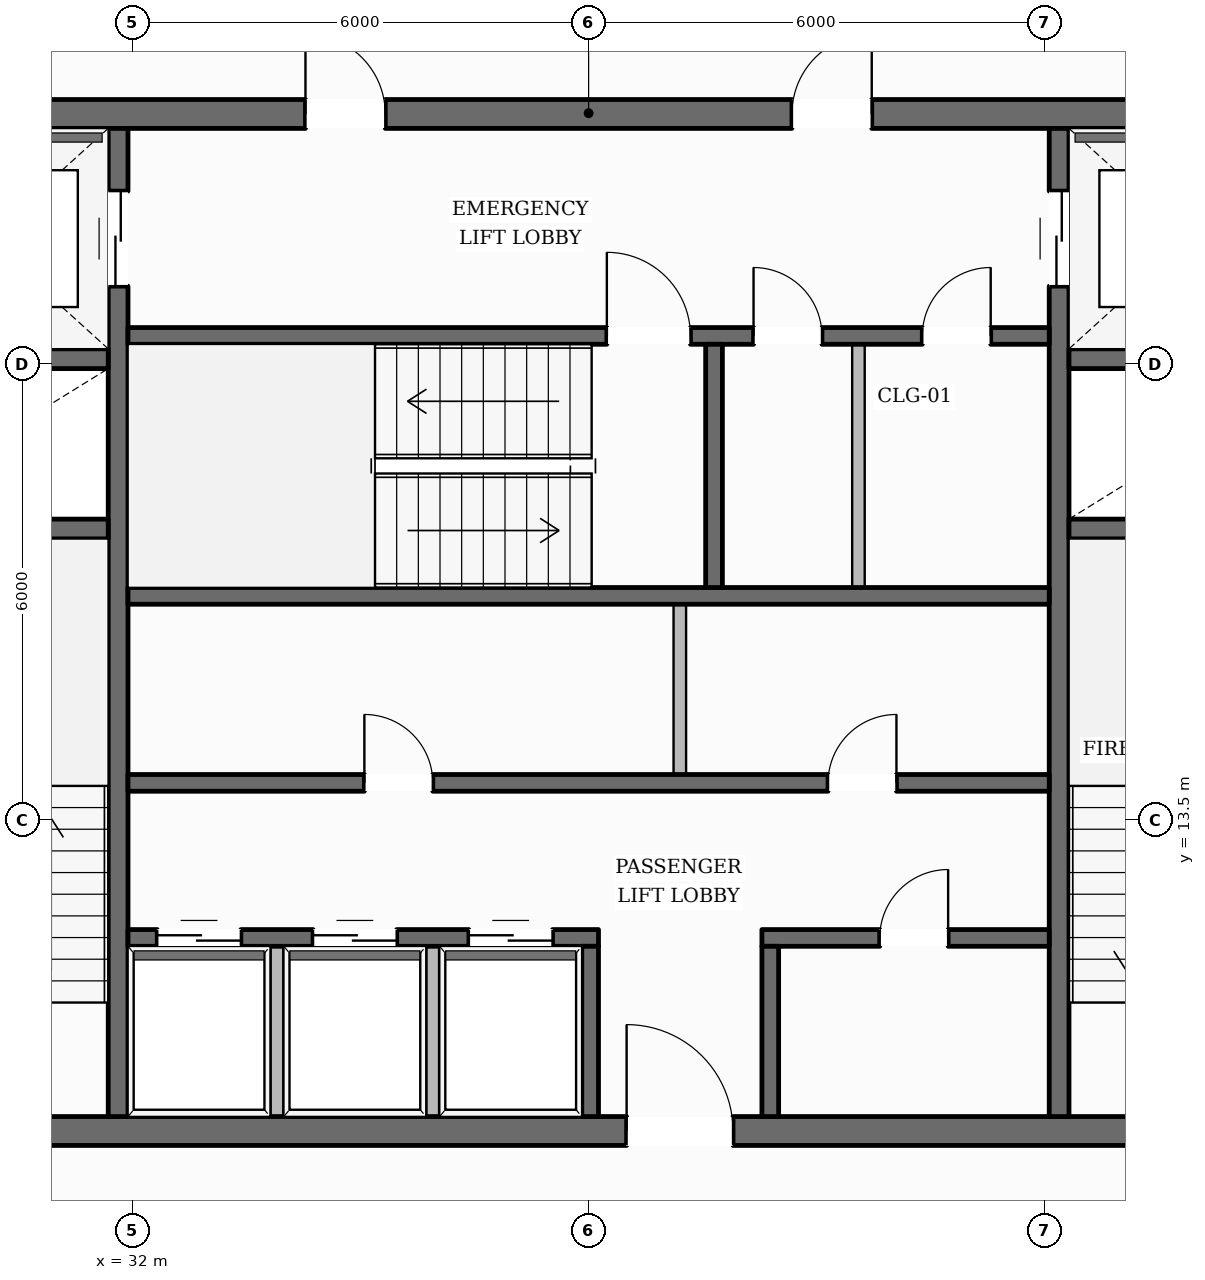
"""IFC4 building model, lengths in metres.
Left out: names, types, materials, properties, quantities, classifications, styles, units other than length and angle.
Written with IfcOpenShell. Run it as: python <this file> out.ifc"""

import sys

from ifc_helpers import new_model, si_unit, direction, frame, frame_2d, origin, place, context, subcontext, project, spatial, rectangle, extrude, element, fill, save


model = new_model("IFC4")
c1 = context("Model", 3, precision=1e-05, world=origin(), true_north=direction((0.0, 1.0)))
c2 = subcontext(c1, "Body", "Model", "MODEL_VIEW")
j1 = project(units=[si_unit("LENGTHUNIT", "METRE"), si_unit("PLANEANGLEUNIT", "RADIAN")], contexts=[c1])
p1 = place(None, origin())
s1 = spatial("IfcSite", under=j1, at=p1, CompositionType="ELEMENT")
p2 = place(p1, origin())
s2 = spatial("IfcBuilding", under=s1, at=p2, CompositionType="ELEMENT")
p3 = place(p2, frame((0.0, 0.0, 270.3)))
s3 = spatial("IfcBuildingStorey", under=s2, at=p3, CompositionType="ELEMENT", Elevation=270.3)
p4 = place(p3, frame((28.1, 9.41, 0.0), z_axis=(0.0, 0.0, 1.0), x_axis=(1.0, 0.0, 0.0)))
e1 = element("IfcWall", 1, at=p4, inside=s3, PredefinedType="SOLIDWALL", context=c2, shape_type="SweptSolid", body=[
    extrude(rectangle(XDim=19.8, YDim=0.38, at=frame_2d((9.9, 0.0))), origin(), (0.0, 0.0, 1.0), 3.61),
])
p5 = place(p4, frame((10.4, 0.0, 0.0)))
e2 = element("IfcOpeningElement", 2, at=p5, cuts=e1, PredefinedType="OPENING", context=c2, shape_type="SweptSolid", body=[
    extrude(rectangle(XDim=1.4, YDim=2.2, at=frame_2d((0.7, 1.1))), frame((0.0, 0.2, 0.0), z_axis=(0.0, -1.0, 0.0), x_axis=(1.0, 0.0, 0.0)), (0.0, 0.0, 1.0), 0.4),
])
p6 = place(p3, frame((28.1, 22.79, 0.0), z_axis=(0.0, 0.0, 1.0), x_axis=(1.0, 0.0, 0.0)))
e3 = element("IfcWall", 3, at=p6, inside=s3, PredefinedType="SOLIDWALL", context=c2, shape_type="SweptSolid", body=[
    extrude(rectangle(XDim=19.8, YDim=0.38, at=frame_2d((9.9, 0.0))), origin(), (0.0, 0.0, 1.0), 3.61),
])
p7 = place(p6, frame((6.175, 0.0, 0.0)))
e4 = element("IfcOpeningElement", 4, at=p7, cuts=e3, PredefinedType="OPENING", context=c2, shape_type="SweptSolid", body=[
    extrude(rectangle(XDim=1.05, YDim=2.15, at=frame_2d((0.525, 1.075))), frame((0.0, 0.2, 0.0), z_axis=(0.0, -1.0, 0.0), x_axis=(1.0, 0.0, 0.0)), (0.0, 0.0, 1.0), 0.4),
])
p8 = place(p6, frame((12.575, 0.0, 0.0)))
e5 = element("IfcOpeningElement", 5, at=p8, cuts=e3, PredefinedType="OPENING", context=c2, shape_type="SweptSolid", body=[
    extrude(rectangle(XDim=1.05, YDim=2.15, at=frame_2d((0.525, 1.075))), frame((0.0, 0.2, 0.0), z_axis=(0.0, -1.0, 0.0), x_axis=(1.0, 0.0, 0.0)), (0.0, 0.0, 1.0), 0.4),
])
p9 = place(p3, frame((31.81, 9.6, 0.0), z_axis=(0.0, 0.0, 1.0), x_axis=(0.0, 1.0, 0.0)))
e6 = element("IfcWall", 6, at=p9, inside=s3, PredefinedType="SHEAR", context=c2, shape_type="SweptSolid", body=[
    extrude(rectangle(XDim=13.0, YDim=0.26, at=frame_2d((6.5, 0.0))), origin(), (0.0, 0.0, 1.0), 3.61),
])
p10 = place(p9, frame((10.925, 0.0, 0.0)))
e7 = element("IfcOpeningElement", 7, at=p10, cuts=e6, PredefinedType="OPENING", context=c2, shape_type="SweptSolid", body=[
    extrude(rectangle(XDim=1.25, YDim=2.25, at=frame_2d((0.625, 1.125))), frame((0.0, 0.14, 0.0), z_axis=(0.0, -1.0, 0.0), x_axis=(1.0, 0.0, 0.0)), (0.0, 0.0, 1.0), 0.28),
])
p11 = place(p3, frame((44.19, 9.6, 0.0), z_axis=(0.0, 0.0, 1.0), x_axis=(0.0, 1.0, 0.0)))
e8 = element("IfcWall", 8, at=p11, inside=s3, PredefinedType="SHEAR", context=c2, shape_type="SweptSolid", body=[
    extrude(rectangle(XDim=13.0, YDim=0.26, at=frame_2d((6.5, 0.0))), origin(), (0.0, 0.0, 1.0), 3.61),
])
p12 = place(p11, frame((10.925, 0.0, 0.0)))
e9 = element("IfcOpeningElement", 9, at=p12, cuts=e8, PredefinedType="OPENING", context=c2, shape_type="SweptSolid", body=[
    extrude(rectangle(XDim=1.25, YDim=2.25, at=frame_2d((0.625, 1.125))), frame((0.0, 0.14, 0.0), z_axis=(0.0, -1.0, 0.0), x_axis=(1.0, 0.0, 0.0)), (0.0, 0.0, 1.0), 0.28),
])
for number, where, z_axis, x_axis in (
    (10, (28.48, 17.33, 0.0), (0.0, 0.0, 1.0), (1.0, 0.0, 0.0)),
    (11, (28.48, 19.57, 0.0), (0.0, 0.0, 1.0), (1.0, 0.0, 0.0)),
    (12, (44.32, 17.33, 0.0), (0.0, 0.0, 1.0), (1.0, 0.0, 0.0)),
    (13, (44.32, 19.57, 0.0), (0.0, 0.0, 1.0), (1.0, 0.0, 0.0)),
):
    element("IfcWall", number, at=place(p3, frame(where, z_axis=z_axis, x_axis=x_axis)), inside=s3, PredefinedType="SHEAR", context=c2, shape_type="SweptSolid", body=[
        extrude(rectangle(XDim=3.2, YDim=0.26, at=frame_2d((1.6, 0.0))), origin(), (0.0, 0.0, 1.0), 3.61),
    ])
p13 = place(p3, frame((31.94, 19.87, 0.0), z_axis=(0.0, 0.0, 1.0), x_axis=(1.0, 0.0, 0.0)))
e14 = element("IfcWall", 14, at=p13, inside=s3, PredefinedType="SOLIDWALL", context=c2, shape_type="SweptSolid", body=[
    extrude(rectangle(XDim=12.12, YDim=0.22, at=frame_2d((6.06, 0.0))), origin(), (0.0, 0.0, 1.0), 3.61),
])
p14 = place(p13, frame((6.3, 0.0, 0.0)))
e15 = element("IfcOpeningElement", 15, at=p14, cuts=e14, PredefinedType="OPENING", context=c2, shape_type="SweptSolid", body=[
    extrude(rectangle(XDim=1.1, YDim=2.15, at=frame_2d((0.55, 1.075))), frame((0.0, 0.12, 0.0), z_axis=(0.0, -1.0, 0.0), x_axis=(1.0, 0.0, 0.0)), (0.0, 0.0, 1.0), 0.24),
])
p15 = place(p13, frame((8.23, 0.0, 0.0)))
e16 = element("IfcOpeningElement", 16, at=p15, cuts=e14, PredefinedType="OPENING", context=c2, shape_type="SweptSolid", body=[
    extrude(rectangle(XDim=0.9, YDim=2.1, at=frame_2d((0.45, 1.05))), frame((0.0, 0.12, 0.0), z_axis=(0.0, -1.0, 0.0), x_axis=(1.0, 0.0, 0.0)), (0.0, 0.0, 1.0), 0.24),
])
p16 = place(p13, frame((10.45, 0.0, 0.0)))
e17 = element("IfcOpeningElement", 17, at=p16, cuts=e14, PredefinedType="OPENING", context=c2, shape_type="SweptSolid", body=[
    extrude(rectangle(XDim=0.9, YDim=2.1, at=frame_2d((0.45, 1.05))), frame((0.0, 0.12, 0.0), z_axis=(0.0, -1.0, 0.0), x_axis=(1.0, 0.0, 0.0)), (0.0, 0.0, 1.0), 0.24),
])
p17 = place(p3, frame((31.94, 16.45, 0.0), z_axis=(0.0, 0.0, 1.0), x_axis=(1.0, 0.0, 0.0)))
e18 = element("IfcWall", 18, at=p17, inside=s3, PredefinedType="SOLIDWALL", context=c2, shape_type="SweptSolid", body=[
    extrude(rectangle(XDim=12.12, YDim=0.22, at=frame_2d((6.06, 0.0))), origin(), (0.0, 0.0, 1.0), 3.61),
])
p18 = place(p3, frame((39.65, 16.56, 0.0), z_axis=(0.0, 0.0, 1.0), x_axis=(0.0, 1.0, 0.0)))
e19 = element("IfcWall", 19, at=p18, inside=s3, PredefinedType="SOLIDWALL", context=c2, shape_type="SweptSolid", body=[
    extrude(rectangle(XDim=3.2, YDim=0.22, at=frame_2d((1.6, 0.0))), origin(), (0.0, 0.0, 1.0), 3.61),
])
p19 = place(p3, frame((31.94, 13.99, 0.0), z_axis=(0.0, 0.0, 1.0), x_axis=(1.0, 0.0, 0.0)))
e20 = element("IfcWall", 20, at=p19, inside=s3, PredefinedType="SOLIDWALL", context=c2, shape_type="SweptSolid", body=[
    extrude(rectangle(XDim=12.12, YDim=0.22, at=frame_2d((6.06, 0.0))), origin(), (0.0, 0.0, 1.0), 3.61),
])
p20 = place(p19, frame((3.11, 0.0, 0.0)))
e21 = element("IfcOpeningElement", 21, at=p20, cuts=e20, PredefinedType="OPENING", context=c2, shape_type="SweptSolid", body=[
    extrude(rectangle(XDim=0.9, YDim=2.1, at=frame_2d((0.45, 1.05))), frame((0.0, 0.12, 0.0), z_axis=(0.0, -1.0, 0.0), x_axis=(1.0, 0.0, 0.0)), (0.0, 0.0, 1.0), 0.24),
])
p21 = place(p19, frame((9.21, 0.0, 0.0)))
e22 = element("IfcOpeningElement", 22, at=p21, cuts=e20, PredefinedType="OPENING", context=c2, shape_type="SweptSolid", body=[
    extrude(rectangle(XDim=0.9, YDim=2.1, at=frame_2d((0.45, 1.05))), frame((0.0, 0.12, 0.0), z_axis=(0.0, -1.0, 0.0), x_axis=(1.0, 0.0, 0.0)), (0.0, 0.0, 1.0), 0.24),
])
p22 = place(p3, frame((31.94, 11.95, 0.0), z_axis=(0.0, 0.0, 1.0), x_axis=(1.0, 0.0, 0.0)))
e23 = element("IfcWall", 23, at=p22, inside=s3, PredefinedType="SOLIDWALL", context=c2, shape_type="SweptSolid", body=[
    extrude(rectangle(XDim=6.19, YDim=0.22, at=frame_2d((3.095, 0.0))), origin(), (0.0, 0.0, 1.0), 3.61),
])
p23 = place(p22, frame((0.385, 0.0, 0.0)))
e24 = element("IfcOpeningElement", 24, at=p23, cuts=e23, PredefinedType="OPENING", context=c2, shape_type="SweptSolid", body=[
    extrude(rectangle(XDim=1.1, YDim=2.2, at=frame_2d((0.55, 1.1))), frame((0.0, 0.12, 0.0), z_axis=(0.0, -1.0, 0.0), x_axis=(1.0, 0.0, 0.0)), (0.0, 0.0, 1.0), 0.24),
])
p24 = place(p22, frame((2.435, 0.0, 0.0)))
e25 = element("IfcOpeningElement", 25, at=p24, cuts=e23, PredefinedType="OPENING", context=c2, shape_type="SweptSolid", body=[
    extrude(rectangle(XDim=1.1, YDim=2.2, at=frame_2d((0.55, 1.1))), frame((0.0, 0.12, 0.0), z_axis=(0.0, -1.0, 0.0), x_axis=(1.0, 0.0, 0.0)), (0.0, 0.0, 1.0), 0.24),
])
p25 = place(p22, frame((4.485, 0.0, 0.0)))
e26 = element("IfcOpeningElement", 26, at=p25, cuts=e23, PredefinedType="OPENING", context=c2, shape_type="SweptSolid", body=[
    extrude(rectangle(XDim=1.1, YDim=2.2, at=frame_2d((0.55, 1.1))), frame((0.0, 0.12, 0.0), z_axis=(0.0, -1.0, 0.0), x_axis=(1.0, 0.0, 0.0)), (0.0, 0.0, 1.0), 0.24),
])
p26 = place(p3, frame((40.28, 11.95, 0.0), z_axis=(0.0, 0.0, 1.0), x_axis=(1.0, 0.0, 0.0)))
e27 = element("IfcWall", 27, at=p26, inside=s3, PredefinedType="SOLIDWALL", context=c2, shape_type="SweptSolid", body=[
    extrude(rectangle(XDim=3.78, YDim=0.22, at=frame_2d((1.89, 0.0))), origin(), (0.0, 0.0, 1.0), 3.61),
])
p27 = place(p26, frame((1.55, 0.0, 0.0)))
e28 = element("IfcOpeningElement", 28, at=p27, cuts=e27, PredefinedType="OPENING", context=c2, shape_type="SweptSolid", body=[
    extrude(rectangle(XDim=0.9, YDim=2.1, at=frame_2d((0.45, 1.05))), frame((0.0, 0.12, 0.0), z_axis=(0.0, -1.0, 0.0), x_axis=(1.0, 0.0, 0.0)), (0.0, 0.0, 1.0), 0.24),
])
for number, where, z_axis, x_axis in (
    (29, (38.02, 9.6, 0.0), (0.0, 0.0, 1.0), (0.0, 1.0, 0.0)),
    (30, (40.39, 9.6, 0.0), (0.0, 0.0, 1.0), (0.0, 1.0, 0.0)),
):
    element("IfcWall", number, at=place(p3, frame(where, z_axis=z_axis, x_axis=x_axis)), inside=s3, PredefinedType="SOLIDWALL", context=c2, shape_type="SweptSolid", body=[
        extrude(rectangle(XDim=2.24, YDim=0.22, at=frame_2d((1.12, 0.0))), origin(), (0.0, 0.0, 1.0), 3.61),
    ])
p28 = place(p3, frame((15.686, 10.536, 0.0), z_axis=(0.0, 0.0, 1.0), x_axis=(0.506100645038, 0.862474426921, 0.0)))
e31 = element("IfcWall", 31, at=p28, inside=s3, PredefinedType="STANDARD", context=c2, shape_type="SweptSolid", body=[
    extrude(rectangle(XDim=38.084, YDim=0.35, at=frame_2d((19.042, 0.0))), origin(), (0.0, 0.0, 1.0), 3.196),
])
p29 = place(p28, frame((27.963, 0.0, 0.0)))
e32 = element("IfcOpeningElement", 32, at=p29, cuts=e31, PredefinedType="OPENING", context=c2, shape_type="SweptSolid", body=[
    extrude(rectangle(XDim=1.0, YDim=2.2, at=frame_2d((0.5, 1.1))), frame((0.0, 0.185, 0.0), z_axis=(0.0, -1.0, 0.0), x_axis=(1.0, 0.0, 0.0)), (0.0, 0.0, 1.0), 0.37),
])
p30 = place(p28, frame((33.839, 0.0, 0.65)))
e33 = element("IfcOpeningElement", 33, at=p30, cuts=e31, PredefinedType="OPENING", context=c2, shape_type="SweptSolid", body=[
    extrude(rectangle(XDim=1.35, YDim=1.75, at=frame_2d((0.675, 0.875))), frame((0.0, 0.185, 0.0), z_axis=(0.0, -1.0, 0.0), x_axis=(1.0, 0.0, 0.0)), (0.0, 0.0, 1.0), 0.37),
])
p31 = place(p28, frame((21.464, 0.0, 0.65)))
e34 = element("IfcOpeningElement", 34, at=p31, cuts=e31, PredefinedType="OPENING", context=c2, shape_type="SweptSolid", body=[
    extrude(rectangle(XDim=1.35, YDim=1.75, at=frame_2d((0.675, 0.875))), frame((0.0, 0.185, 0.0), z_axis=(0.0, -1.0, 0.0), x_axis=(1.0, 0.0, 0.0)), (0.0, 0.0, 1.0), 0.37),
])
p32 = place(p28, frame((9.089, 0.0, 0.65)))
e35 = element("IfcOpeningElement", 35, at=p32, cuts=e31, PredefinedType="OPENING", context=c2, shape_type="SweptSolid", body=[
    extrude(rectangle(XDim=1.35, YDim=1.75, at=frame_2d((0.675, 0.875))), frame((0.0, 0.185, 0.0), z_axis=(0.0, -1.0, 0.0), x_axis=(1.0, 0.0, 0.0)), (0.0, 0.0, 1.0), 0.37),
])
p33 = place(p28, frame((2.902, 0.0, 0.65)))
e36 = element("IfcOpeningElement", 36, at=p33, cuts=e31, PredefinedType="OPENING", context=c2, shape_type="SweptSolid", body=[
    extrude(rectangle(XDim=1.35, YDim=1.75, at=frame_2d((0.675, 0.875))), frame((0.0, 0.185, 0.0), z_axis=(0.0, -1.0, 0.0), x_axis=(1.0, 0.0, 0.0)), (0.0, 0.0, 1.0), 0.37),
])
p34 = place(p3, frame((41.09, 43.352, 0.0), z_axis=(0.0, 0.0, 1.0), x_axis=(0.509850521087, -0.860263009868, 0.0)))
e37 = element("IfcWall", 37, at=p34, inside=s3, PredefinedType="STANDARD", context=c2, shape_type="SweptSolid", body=[
    extrude(rectangle(XDim=38.375, YDim=0.35, at=frame_2d((19.188, 0.0))), origin(), (0.0, 0.0, 1.0), 3.196),
])
p35 = place(p34, frame((28.181, 0.0, 0.0)))
e38 = element("IfcOpeningElement", 38, at=p35, cuts=e37, PredefinedType="OPENING", context=c2, shape_type="SweptSolid", body=[
    extrude(rectangle(XDim=1.0, YDim=2.2, at=frame_2d((0.5, 1.1))), frame((0.0, 0.185, 0.0), z_axis=(0.0, -1.0, 0.0), x_axis=(1.0, 0.0, 0.0)), (0.0, 0.0, 1.0), 0.37),
])
p36 = place(p34, frame((34.098, 0.0, 0.65)))
e39 = element("IfcOpeningElement", 39, at=p36, cuts=e37, PredefinedType="OPENING", context=c2, shape_type="SweptSolid", body=[
    extrude(rectangle(XDim=1.35, YDim=1.75, at=frame_2d((0.675, 0.875))), frame((0.0, 0.185, 0.0), z_axis=(0.0, -1.0, 0.0), x_axis=(1.0, 0.0, 0.0)), (0.0, 0.0, 1.0), 0.37),
])
p37 = place(p34, frame((21.625, 0.0, 0.65)))
e40 = element("IfcOpeningElement", 40, at=p37, cuts=e37, PredefinedType="OPENING", context=c2, shape_type="SweptSolid", body=[
    extrude(rectangle(XDim=1.35, YDim=1.75, at=frame_2d((0.675, 0.875))), frame((0.0, 0.185, 0.0), z_axis=(0.0, -1.0, 0.0), x_axis=(1.0, 0.0, 0.0)), (0.0, 0.0, 1.0), 0.37),
])
p38 = place(p34, frame((9.152, 0.0, 0.65)))
e41 = element("IfcOpeningElement", 41, at=p38, cuts=e37, PredefinedType="OPENING", context=c2, shape_type="SweptSolid", body=[
    extrude(rectangle(XDim=1.35, YDim=1.75, at=frame_2d((0.675, 0.875))), frame((0.0, 0.185, 0.0), z_axis=(0.0, -1.0, 0.0), x_axis=(1.0, 0.0, 0.0)), (0.0, 0.0, 1.0), 0.37),
])
p39 = place(p34, frame((2.915, 0.0, 0.65)))
e42 = element("IfcOpeningElement", 42, at=p39, cuts=e37, PredefinedType="OPENING", context=c2, shape_type="SweptSolid", body=[
    extrude(rectangle(XDim=1.35, YDim=1.75, at=frame_2d((0.675, 0.875))), frame((0.0, 0.185, 0.0), z_axis=(0.0, -1.0, 0.0), x_axis=(1.0, 0.0, 0.0)), (0.0, 0.0, 1.0), 0.37),
])
for number, where, z_axis, x_axis in (
    (43, (33.9, 9.49, 0.0), (0.0, 0.0, 1.0), (0.0, 1.0, 0.0)),
    (44, (35.95, 9.49, 0.0), (0.0, 0.0, 1.0), (0.0, 1.0, 0.0)),
):
    element("IfcWall", number, at=place(p3, frame(where, z_axis=z_axis, x_axis=x_axis)), inside=s3, PredefinedType="PARTITIONING", context=c2, shape_type="SweptSolid", body=[
        extrude(rectangle(XDim=2.35, YDim=0.165, at=frame_2d((1.175, 0.0))), origin(), (0.0, 0.0, 1.0), 3.61),
    ])
p40 = place(p3, frame((39.2, 14.1, 0.0), z_axis=(0.0, 0.0, 1.0), x_axis=(0.0, 1.0, 0.0)))
e45 = element("IfcWall", 45, at=p40, inside=s3, PredefinedType="PARTITIONING", context=c2, shape_type="SweptSolid", body=[
    extrude(rectangle(XDim=2.24, YDim=0.165, at=frame_2d((1.12, 0.0))), origin(), (0.0, 0.0, 1.0), 3.61),
])
p41 = place(p3, frame((41.55, 16.56, 0.0), z_axis=(0.0, 0.0, 1.0), x_axis=(0.0, 1.0, 0.0)))
e46 = element("IfcWall", 46, at=p41, inside=s3, PredefinedType="PARTITIONING", context=c2, shape_type="SweptSolid", body=[
    extrude(rectangle(XDim=3.2, YDim=0.165, at=frame_2d((1.6, 0.0))), origin(), (0.0, 0.0, 1.0), 3.61),
])
p42 = place(p14, origin())
e47 = element("IfcDoor", 47, at=p42, inside=s3, OperationType="SINGLE_SWING_LEFT", PredefinedType="DOOR", context=c2, shape_type="SweptSolid", body=[
    extrude(rectangle(XDim=1.1, YDim=2.15, at=frame_2d((0.55, 1.075))), frame((0.0, 0.025, 0.0), z_axis=(0.0, -1.0, 0.0), x_axis=(1.0, 0.0, 0.0)), (0.0, 0.0, 1.0), 0.05),
])
fill(e15, e47)
p43 = place(p7, origin())
e48 = element("IfcDoor", 48, at=p43, inside=s3, OperationType="SINGLE_SWING_LEFT", PredefinedType="DOOR", context=c2, shape_type="SweptSolid", body=[
    extrude(rectangle(XDim=1.05, YDim=2.15, at=frame_2d((0.525, 1.075))), frame((0.0, 0.025, 0.0), z_axis=(0.0, -1.0, 0.0), x_axis=(1.0, 0.0, 0.0)), (0.0, 0.0, 1.0), 0.05),
])
fill(e4, e48)
p44 = place(p8, origin())
e49 = element("IfcDoor", 49, at=p44, inside=s3, OperationType="SINGLE_SWING_RIGHT", PredefinedType="DOOR", context=c2, shape_type="SweptSolid", body=[
    extrude(rectangle(XDim=1.05, YDim=2.15, at=frame_2d((0.525, 1.075))), frame((0.0, 0.025, 0.0), z_axis=(0.0, -1.0, 0.0), x_axis=(1.0, 0.0, 0.0)), (0.0, 0.0, 1.0), 0.05),
])
fill(e5, e49)
p45 = place(p10, origin())
e50 = element("IfcDoor", 50, at=p45, inside=s3, OperationType="DOUBLE_DOOR_SLIDING", PredefinedType="DOOR", context=c2, shape_type="SweptSolid", body=[
    extrude(rectangle(XDim=1.25, YDim=2.25, at=frame_2d((0.625, 1.125))), frame((0.0, 0.025, 0.0), z_axis=(0.0, -1.0, 0.0), x_axis=(1.0, 0.0, 0.0)), (0.0, 0.0, 1.0), 0.05),
])
fill(e7, e50)
p46 = place(p12, origin())
e51 = element("IfcDoor", 51, at=p46, inside=s3, OperationType="DOUBLE_DOOR_SLIDING", PredefinedType="DOOR", context=c2, shape_type="SweptSolid", body=[
    extrude(rectangle(XDim=1.25, YDim=2.25, at=frame_2d((0.625, 1.125))), frame((0.0, 0.025, 0.0), z_axis=(0.0, -1.0, 0.0), x_axis=(1.0, 0.0, 0.0)), (0.0, 0.0, 1.0), 0.05),
])
fill(e9, e51)
p47 = place(p5, origin())
e52 = element("IfcDoor", 52, at=p47, inside=s3, OperationType="SINGLE_SWING_LEFT", PredefinedType="DOOR", context=c2, shape_type="SweptSolid", body=[
    extrude(rectangle(XDim=1.4, YDim=2.2, at=frame_2d((0.7, 1.1))), frame((0.0, 0.025, 0.0), z_axis=(0.0, -1.0, 0.0), x_axis=(1.0, 0.0, 0.0)), (0.0, 0.0, 1.0), 0.05),
])
fill(e2, e52)
p48 = place(p23, origin())
e53 = element("IfcDoor", 53, at=p48, inside=s3, OperationType="DOUBLE_DOOR_SLIDING", PredefinedType="DOOR", context=c2, shape_type="SweptSolid", body=[
    extrude(rectangle(XDim=1.1, YDim=2.2, at=frame_2d((0.55, 1.1))), frame((0.0, 0.025, 0.0), z_axis=(0.0, -1.0, 0.0), x_axis=(1.0, 0.0, 0.0)), (0.0, 0.0, 1.0), 0.05),
])
fill(e24, e53)
p49 = place(p24, origin())
e54 = element("IfcDoor", 54, at=p49, inside=s3, OperationType="DOUBLE_DOOR_SLIDING", PredefinedType="DOOR", context=c2, shape_type="SweptSolid", body=[
    extrude(rectangle(XDim=1.1, YDim=2.2, at=frame_2d((0.55, 1.1))), frame((0.0, 0.025, 0.0), z_axis=(0.0, -1.0, 0.0), x_axis=(1.0, 0.0, 0.0)), (0.0, 0.0, 1.0), 0.05),
])
fill(e25, e54)
p50 = place(p25, origin())
e55 = element("IfcDoor", 55, at=p50, inside=s3, OperationType="DOUBLE_DOOR_SLIDING", PredefinedType="DOOR", context=c2, shape_type="SweptSolid", body=[
    extrude(rectangle(XDim=1.1, YDim=2.2, at=frame_2d((0.55, 1.1))), frame((0.0, 0.025, 0.0), z_axis=(0.0, -1.0, 0.0), x_axis=(1.0, 0.0, 0.0)), (0.0, 0.0, 1.0), 0.05),
])
fill(e26, e55)
p51 = place(p20, origin())
e56 = element("IfcDoor", 56, at=p51, inside=s3, OperationType="SINGLE_SWING_LEFT", PredefinedType="DOOR", context=c2, shape_type="SweptSolid", body=[
    extrude(rectangle(XDim=0.9, YDim=2.1, at=frame_2d((0.45, 1.05))), frame((0.0, 0.025, 0.0), z_axis=(0.0, -1.0, 0.0), x_axis=(1.0, 0.0, 0.0)), (0.0, 0.0, 1.0), 0.05),
])
fill(e21, e56)
p52 = place(p21, origin())
e57 = element("IfcDoor", 57, at=p52, inside=s3, OperationType="SINGLE_SWING_RIGHT", PredefinedType="DOOR", context=c2, shape_type="SweptSolid", body=[
    extrude(rectangle(XDim=0.9, YDim=2.1, at=frame_2d((0.45, 1.05))), frame((0.0, 0.025, 0.0), z_axis=(0.0, -1.0, 0.0), x_axis=(1.0, 0.0, 0.0)), (0.0, 0.0, 1.0), 0.05),
])
fill(e22, e57)
p53 = place(p15, origin())
e58 = element("IfcDoor", 58, at=p53, inside=s3, OperationType="SINGLE_SWING_LEFT", PredefinedType="DOOR", context=c2, shape_type="SweptSolid", body=[
    extrude(rectangle(XDim=0.9, YDim=2.1, at=frame_2d((0.45, 1.05))), frame((0.0, 0.025, 0.0), z_axis=(0.0, -1.0, 0.0), x_axis=(1.0, 0.0, 0.0)), (0.0, 0.0, 1.0), 0.05),
])
fill(e16, e58)
p54 = place(p16, origin())
e59 = element("IfcDoor", 59, at=p54, inside=s3, OperationType="SINGLE_SWING_RIGHT", PredefinedType="DOOR", context=c2, shape_type="SweptSolid", body=[
    extrude(rectangle(XDim=0.9, YDim=2.1, at=frame_2d((0.45, 1.05))), frame((0.0, 0.025, 0.0), z_axis=(0.0, -1.0, 0.0), x_axis=(1.0, 0.0, 0.0)), (0.0, 0.0, 1.0), 0.05),
])
fill(e17, e59)
p55 = place(p27, origin())
e60 = element("IfcDoor", 60, at=p55, inside=s3, OperationType="SINGLE_SWING_RIGHT", PredefinedType="DOOR", context=c2, shape_type="SweptSolid", body=[
    extrude(rectangle(XDim=0.9, YDim=2.1, at=frame_2d((0.45, 1.05))), frame((0.0, 0.025, 0.0), z_axis=(0.0, -1.0, 0.0), x_axis=(1.0, 0.0, 0.0)), (0.0, 0.0, 1.0), 0.05),
])
fill(e28, e60)
save(model, sys.argv[1])
